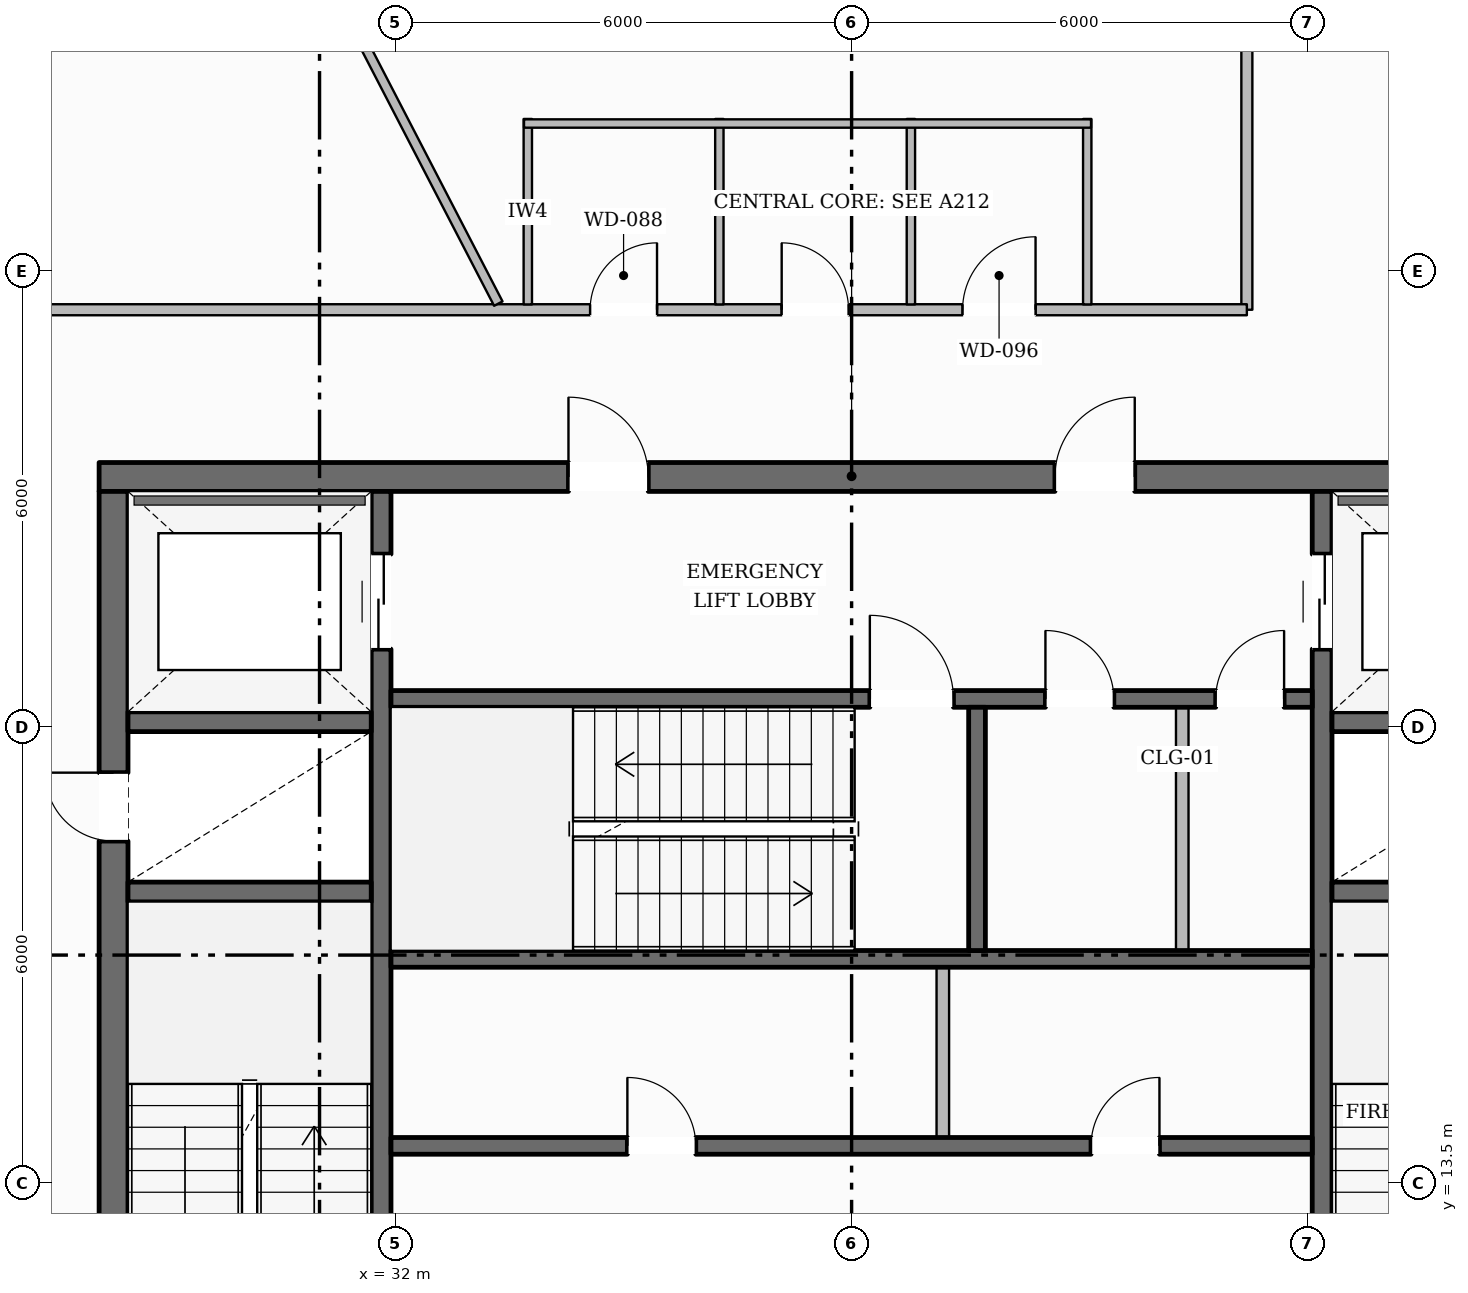
"""IFC4 building model, lengths in metres.
Left out: names, types, materials, properties, quantities, classifications, styles, units other than length and angle.
Written with IfcOpenShell. Run it as: python <this file> out.ifc"""

import sys

from ifc_helpers import new_model, si_unit, direction, frame, frame_2d, origin, place, context, subcontext, project, spatial, rectangle, extrude, element, fill, save


model = new_model("IFC4")
c1 = context("Model", 3, precision=1e-05, world=origin(), true_north=direction((0.0, 1.0)))
c2 = subcontext(c1, "Body", "Model", "MODEL_VIEW")
j1 = project(units=[si_unit("LENGTHUNIT", "METRE"), si_unit("PLANEANGLEUNIT", "RADIAN")], contexts=[c1])
p1 = place(None, origin())
s1 = spatial("IfcSite", under=j1, at=p1, CompositionType="ELEMENT")
p2 = place(p1, origin())
s2 = spatial("IfcBuilding", under=s1, at=p2, CompositionType="ELEMENT")
p3 = place(p2, frame((0.0, 0.0, 304.95)))
s3 = spatial("IfcBuildingStorey", under=s2, at=p3, CompositionType="ELEMENT", Elevation=304.95)
p4 = place(p3, frame((28.1, 22.79, 0.0), z_axis=(0.0, 0.0, 1.0), x_axis=(1.0, 0.0, 0.0)))
e1 = element("IfcWall", 1, at=p4, inside=s3, PredefinedType="SOLIDWALL", context=c2, shape_type="SweptSolid", body=[
    extrude(rectangle(XDim=19.8, YDim=0.38, at=frame_2d((9.9, 0.0))), origin(), (0.0, 0.0, 1.0), 4.77),
])
p5 = place(p4, frame((6.175, 0.0, 0.0)))
e2 = element("IfcOpeningElement", 2, at=p5, cuts=e1, PredefinedType="OPENING", context=c2, shape_type="SweptSolid", body=[
    extrude(rectangle(XDim=1.05, YDim=2.15, at=frame_2d((0.525, 1.075))), frame((0.0, 0.2, 0.0), z_axis=(0.0, -1.0, 0.0), x_axis=(1.0, 0.0, 0.0)), (0.0, 0.0, 1.0), 0.4),
])
p6 = place(p4, frame((12.575, 0.0, 0.0)))
e3 = element("IfcOpeningElement", 3, at=p6, cuts=e1, PredefinedType="OPENING", context=c2, shape_type="SweptSolid", body=[
    extrude(rectangle(XDim=1.05, YDim=2.15, at=frame_2d((0.525, 1.075))), frame((0.0, 0.2, 0.0), z_axis=(0.0, -1.0, 0.0), x_axis=(1.0, 0.0, 0.0)), (0.0, 0.0, 1.0), 0.4),
])
p7 = place(p3, frame((28.29, 9.6, 0.0), z_axis=(0.0, 0.0, 1.0), x_axis=(0.0, 1.0, 0.0)))
e4 = element("IfcWall", 4, at=p7, inside=s3, PredefinedType="SOLIDWALL", context=c2, shape_type="SweptSolid", body=[
    extrude(rectangle(XDim=13.0, YDim=0.38, at=frame_2d((6.5, 0.0))), origin(), (0.0, 0.0, 1.0), 4.77),
])
p8 = place(p7, frame((0.2, 0.0, 0.0)))
e5 = element("IfcOpeningElement", 5, at=p8, cuts=e4, PredefinedType="OPENING", context=c2, shape_type="SweptSolid", body=[
    extrude(rectangle(XDim=1.1, YDim=2.15, at=frame_2d((0.55, 1.075))), frame((0.0, 0.2, 0.0), z_axis=(0.0, -1.0, 0.0), x_axis=(1.0, 0.0, 0.0)), (0.0, 0.0, 1.0), 0.4),
])
p9 = place(p7, frame((8.4, 0.0, 0.0)))
e6 = element("IfcOpeningElement", 6, at=p9, cuts=e4, PredefinedType="OPENING", context=c2, shape_type="SweptSolid", body=[
    extrude(rectangle(XDim=0.9, YDim=2.1, at=frame_2d((0.45, 1.05))), frame((0.0, 0.2, 0.0), z_axis=(0.0, -1.0, 0.0), x_axis=(1.0, 0.0, 0.0)), (0.0, 0.0, 1.0), 0.4),
])
p10 = place(p3, frame((31.81, 9.6, 0.0), z_axis=(0.0, 0.0, 1.0), x_axis=(0.0, 1.0, 0.0)))
e7 = element("IfcWall", 7, at=p10, inside=s3, PredefinedType="SHEAR", context=c2, shape_type="SweptSolid", body=[
    extrude(rectangle(XDim=13.0, YDim=0.26, at=frame_2d((6.5, 0.0))), origin(), (0.0, 0.0, 1.0), 4.77),
])
p11 = place(p10, frame((10.925, 0.0, 0.0)))
e8 = element("IfcOpeningElement", 8, at=p11, cuts=e7, PredefinedType="OPENING", context=c2, shape_type="SweptSolid", body=[
    extrude(rectangle(XDim=1.25, YDim=2.25, at=frame_2d((0.625, 1.125))), frame((0.0, 0.14, 0.0), z_axis=(0.0, -1.0, 0.0), x_axis=(1.0, 0.0, 0.0)), (0.0, 0.0, 1.0), 0.28),
])
p12 = place(p3, frame((44.19, 9.6, 0.0), z_axis=(0.0, 0.0, 1.0), x_axis=(0.0, 1.0, 0.0)))
e9 = element("IfcWall", 9, at=p12, inside=s3, PredefinedType="SHEAR", context=c2, shape_type="SweptSolid", body=[
    extrude(rectangle(XDim=13.0, YDim=0.26, at=frame_2d((6.5, 0.0))), origin(), (0.0, 0.0, 1.0), 4.77),
])
p13 = place(p12, frame((10.925, 0.0, 0.0)))
e10 = element("IfcOpeningElement", 10, at=p13, cuts=e9, PredefinedType="OPENING", context=c2, shape_type="SweptSolid", body=[
    extrude(rectangle(XDim=1.25, YDim=2.25, at=frame_2d((0.625, 1.125))), frame((0.0, 0.14, 0.0), z_axis=(0.0, -1.0, 0.0), x_axis=(1.0, 0.0, 0.0)), (0.0, 0.0, 1.0), 0.28),
])
for number, where, z_axis, x_axis in (
    (11, (28.48, 17.33, 0.0), (0.0, 0.0, 1.0), (1.0, 0.0, 0.0)),
    (12, (28.48, 19.57, 0.0), (0.0, 0.0, 1.0), (1.0, 0.0, 0.0)),
    (13, (44.32, 17.33, 0.0), (0.0, 0.0, 1.0), (1.0, 0.0, 0.0)),
    (14, (44.32, 19.57, 0.0), (0.0, 0.0, 1.0), (1.0, 0.0, 0.0)),
):
    element("IfcWall", number, at=place(p3, frame(where, z_axis=z_axis, x_axis=x_axis)), inside=s3, PredefinedType="SHEAR", context=c2, shape_type="SweptSolid", body=[
        extrude(rectangle(XDim=3.2, YDim=0.26, at=frame_2d((1.6, 0.0))), origin(), (0.0, 0.0, 1.0), 4.77),
    ])
p14 = place(p3, frame((31.94, 19.87, 0.0), z_axis=(0.0, 0.0, 1.0), x_axis=(1.0, 0.0, 0.0)))
e15 = element("IfcWall", 15, at=p14, inside=s3, PredefinedType="SOLIDWALL", context=c2, shape_type="SweptSolid", body=[
    extrude(rectangle(XDim=12.12, YDim=0.22, at=frame_2d((6.06, 0.0))), origin(), (0.0, 0.0, 1.0), 4.77),
])
p15 = place(p14, frame((6.3, 0.0, 0.0)))
e16 = element("IfcOpeningElement", 16, at=p15, cuts=e15, PredefinedType="OPENING", context=c2, shape_type="SweptSolid", body=[
    extrude(rectangle(XDim=1.1, YDim=2.15, at=frame_2d((0.55, 1.075))), frame((0.0, 0.12, 0.0), z_axis=(0.0, -1.0, 0.0), x_axis=(1.0, 0.0, 0.0)), (0.0, 0.0, 1.0), 0.24),
])
p16 = place(p14, frame((8.61, 0.0, 0.0)))
e17 = element("IfcOpeningElement", 17, at=p16, cuts=e15, PredefinedType="OPENING", context=c2, shape_type="SweptSolid", body=[
    extrude(rectangle(XDim=0.9, YDim=2.1, at=frame_2d((0.45, 1.05))), frame((0.0, 0.12, 0.0), z_axis=(0.0, -1.0, 0.0), x_axis=(1.0, 0.0, 0.0)), (0.0, 0.0, 1.0), 0.24),
])
p17 = place(p14, frame((10.85, 0.0, 0.0)))
e18 = element("IfcOpeningElement", 18, at=p17, cuts=e15, PredefinedType="OPENING", context=c2, shape_type="SweptSolid", body=[
    extrude(rectangle(XDim=0.9, YDim=2.1, at=frame_2d((0.45, 1.05))), frame((0.0, 0.12, 0.0), z_axis=(0.0, -1.0, 0.0), x_axis=(1.0, 0.0, 0.0)), (0.0, 0.0, 1.0), 0.24),
])
p18 = place(p3, frame((31.94, 16.45, 0.0), z_axis=(0.0, 0.0, 1.0), x_axis=(1.0, 0.0, 0.0)))
e19 = element("IfcWall", 19, at=p18, inside=s3, PredefinedType="SOLIDWALL", context=c2, shape_type="SweptSolid", body=[
    extrude(rectangle(XDim=12.12, YDim=0.22, at=frame_2d((6.06, 0.0))), origin(), (0.0, 0.0, 1.0), 4.77),
])
p19 = place(p3, frame((39.65, 16.56, 0.0), z_axis=(0.0, 0.0, 1.0), x_axis=(0.0, 1.0, 0.0)))
e20 = element("IfcWall", 20, at=p19, inside=s3, PredefinedType="SOLIDWALL", context=c2, shape_type="SweptSolid", body=[
    extrude(rectangle(XDim=3.2, YDim=0.22, at=frame_2d((1.6, 0.0))), origin(), (0.0, 0.0, 1.0), 4.77),
])
p20 = place(p3, frame((31.94, 13.99, 0.0), z_axis=(0.0, 0.0, 1.0), x_axis=(1.0, 0.0, 0.0)))
e21 = element("IfcWall", 21, at=p20, inside=s3, PredefinedType="SOLIDWALL", context=c2, shape_type="SweptSolid", body=[
    extrude(rectangle(XDim=12.12, YDim=0.22, at=frame_2d((6.06, 0.0))), origin(), (0.0, 0.0, 1.0), 4.77),
])
p21 = place(p20, frame((3.11, 0.0, 0.0)))
e22 = element("IfcOpeningElement", 22, at=p21, cuts=e21, PredefinedType="OPENING", context=c2, shape_type="SweptSolid", body=[
    extrude(rectangle(XDim=0.9, YDim=2.1, at=frame_2d((0.45, 1.05))), frame((0.0, 0.12, 0.0), z_axis=(0.0, -1.0, 0.0), x_axis=(1.0, 0.0, 0.0)), (0.0, 0.0, 1.0), 0.24),
])
p22 = place(p20, frame((9.21, 0.0, 0.0)))
e23 = element("IfcOpeningElement", 23, at=p22, cuts=e21, PredefinedType="OPENING", context=c2, shape_type="SweptSolid", body=[
    extrude(rectangle(XDim=0.9, YDim=2.1, at=frame_2d((0.45, 1.05))), frame((0.0, 0.12, 0.0), z_axis=(0.0, -1.0, 0.0), x_axis=(1.0, 0.0, 0.0)), (0.0, 0.0, 1.0), 0.24),
])
p23 = place(p3, frame((15.972, 10.23, 0.0), z_axis=(0.0, 0.0, 1.0), x_axis=(0.490734788737, 0.871308996352, 0.0)))
e24 = element("IfcWall", 24, at=p23, inside=s3, PredefinedType="STANDARD", context=c2, shape_type="SweptSolid", body=[
    extrude(rectangle(XDim=39.892, YDim=0.35, at=frame_2d((19.946, 0.0))), origin(), (0.0, 0.0, 1.0), 4.012),
])
p24 = place(p23, frame((35.116, 0.0, 0.65)))
e25 = element("IfcOpeningElement", 25, at=p24, cuts=e24, PredefinedType="OPENING", context=c2, shape_type="SweptSolid", body=[
    extrude(rectangle(XDim=2.1, YDim=2.3, at=frame_2d((1.05, 1.15))), frame((0.0, 0.185, 0.0), z_axis=(0.0, -1.0, 0.0), x_axis=(1.0, 0.0, 0.0)), (0.0, 0.0, 1.0), 0.37),
])
p25 = place(p23, frame((2.666, 0.0, 0.65)))
e26 = element("IfcOpeningElement", 26, at=p25, cuts=e24, PredefinedType="OPENING", context=c2, shape_type="SweptSolid", body=[
    extrude(rectangle(XDim=2.1, YDim=2.3, at=frame_2d((1.05, 1.15))), frame((0.0, 0.185, 0.0), z_axis=(0.0, -1.0, 0.0), x_axis=(1.0, 0.0, 0.0)), (0.0, 0.0, 1.0), 0.37),
])
p26 = place(p3, frame((40.452, 44.989, 0.0), z_axis=(0.0, 0.0, 1.0), x_axis=(0.490734788737, -0.871308996352, 0.0)))
e27 = element("IfcWall", 27, at=p26, inside=s3, PredefinedType="STANDARD", context=c2, shape_type="SweptSolid", body=[
    extrude(rectangle(XDim=39.892, YDim=0.35, at=frame_2d((19.946, 0.0))), origin(), (0.0, 0.0, 1.0), 4.012),
])
p27 = place(p26, frame((35.126, 0.0, 0.65)))
e28 = element("IfcOpeningElement", 28, at=p27, cuts=e27, PredefinedType="OPENING", context=c2, shape_type="SweptSolid", body=[
    extrude(rectangle(XDim=2.1, YDim=2.3, at=frame_2d((1.05, 1.15))), frame((0.0, 0.185, 0.0), z_axis=(0.0, -1.0, 0.0), x_axis=(1.0, 0.0, 0.0)), (0.0, 0.0, 1.0), 0.37),
])
p28 = place(p26, frame((2.676, 0.0, 0.65)))
e29 = element("IfcOpeningElement", 29, at=p28, cuts=e27, PredefinedType="OPENING", context=c2, shape_type="SweptSolid", body=[
    extrude(rectangle(XDim=2.1, YDim=2.3, at=frame_2d((1.05, 1.15))), frame((0.0, 0.185, 0.0), z_axis=(0.0, -1.0, 0.0), x_axis=(1.0, 0.0, 0.0)), (0.0, 0.0, 1.0), 0.37),
])
p29 = place(p3, frame((39.2, 14.1, 0.0), z_axis=(0.0, 0.0, 1.0), x_axis=(0.0, 1.0, 0.0)))
e30 = element("IfcWall", 30, at=p29, inside=s3, PredefinedType="PARTITIONING", context=c2, shape_type="SweptSolid", body=[
    extrude(rectangle(XDim=2.24, YDim=0.165, at=frame_2d((1.12, 0.0))), origin(), (0.0, 0.0, 1.0), 4.77),
])
p30 = place(p3, frame((42.35, 16.56, 0.0), z_axis=(0.0, 0.0, 1.0), x_axis=(0.0, 1.0, 0.0)))
e31 = element("IfcWall", 31, at=p30, inside=s3, PredefinedType="PARTITIONING", context=c2, shape_type="SweptSolid", body=[
    extrude(rectangle(XDim=3.2, YDim=0.165, at=frame_2d((1.6, 0.0))), origin(), (0.0, 0.0, 1.0), 4.77),
])
p31 = place(p3, frame((43.2, 24.99, 0.0), z_axis=(0.0, 0.0, 1.0), x_axis=(0.0, 1.0, 0.0)))
e32 = element("IfcWall", 32, at=p31, inside=s3, PredefinedType="PARTITIONING", context=c2, shape_type="SweptSolid", body=[
    extrude(rectangle(XDim=8.884, YDim=0.145, at=frame_2d((4.442, 0.0))), origin(), (0.0, 0.0, 1.0), 4.77),
])
p32 = place(p31, frame((3.742, 0.0, 0.0)))
e33 = element("IfcOpeningElement", 33, at=p32, cuts=e32, PredefinedType="OPENING", context=c2, shape_type="SweptSolid", body=[
    extrude(rectangle(XDim=1.4, YDim=2.2, at=frame_2d((0.7, 1.1))), frame((0.0, 0.083, 0.0), z_axis=(0.0, -1.0, 0.0), x_axis=(1.0, 0.0, 0.0)), (0.0, 0.0, 1.0), 0.165),
])
p33 = place(p3, frame((26.09, 24.99, 0.0), z_axis=(0.0, 0.0, 1.0), x_axis=(1.0, 0.0, 0.0)))
e34 = element("IfcWall", 34, at=p33, inside=s3, PredefinedType="PARTITIONING", context=c2, shape_type="SweptSolid", body=[
    extrude(rectangle(XDim=17.11, YDim=0.145, at=frame_2d((8.555, 0.0))), origin(), (0.0, 0.0, 1.0), 4.77),
])
p34 = place(p33, frame((8.47, 0.0, 0.0)))
e35 = element("IfcOpeningElement", 35, at=p34, cuts=e34, PredefinedType="OPENING", context=c2, shape_type="SweptSolid", body=[
    extrude(rectangle(XDim=0.88, YDim=2.1, at=frame_2d((0.44, 1.05))), frame((0.0, 0.083, 0.0), z_axis=(0.0, -1.0, 0.0), x_axis=(1.0, 0.0, 0.0)), (0.0, 0.0, 1.0), 0.165),
])
p35 = place(p33, frame((10.99, 0.0, 0.0)))
e36 = element("IfcOpeningElement", 36, at=p35, cuts=e34, PredefinedType="OPENING", context=c2, shape_type="SweptSolid", body=[
    extrude(rectangle(XDim=0.88, YDim=2.1, at=frame_2d((0.44, 1.05))), frame((0.0, 0.083, 0.0), z_axis=(0.0, -1.0, 0.0), x_axis=(1.0, 0.0, 0.0)), (0.0, 0.0, 1.0), 0.165),
])
p36 = place(p33, frame((13.37, 0.0, 0.0)))
e37 = element("IfcOpeningElement", 37, at=p36, cuts=e34, PredefinedType="OPENING", context=c2, shape_type="SweptSolid", body=[
    extrude(rectangle(XDim=0.96, YDim=2.1, at=frame_2d((0.48, 1.05))), frame((0.0, 0.083, 0.0), z_axis=(0.0, -1.0, 0.0), x_axis=(1.0, 0.0, 0.0)), (0.0, 0.0, 1.0), 0.165),
])
for number, where, z_axis, x_axis in (
    (38, (33.74, 25.06, 0.0), (0.0, 0.0, 1.0), (0.0, 1.0, 0.0)),
    (39, (36.26, 25.06, 0.0), (0.0, 0.0, 1.0), (0.0, 1.0, 0.0)),
    (40, (38.78, 25.06, 0.0), (0.0, 0.0, 1.0), (0.0, 1.0, 0.0)),
    (41, (41.1, 25.06, 0.0), (0.0, 0.0, 1.0), (0.0, 1.0, 0.0)),
):
    element("IfcWall", number, at=place(p3, frame(where, z_axis=z_axis, x_axis=x_axis)), inside=s3, PredefinedType="PLUMBINGWALL", context=c2, shape_type="SweptSolid", body=[
        extrude(rectangle(XDim=2.44, YDim=0.11, at=frame_2d((1.22, 0.0))), origin(), (0.0, 0.0, 1.0), 4.77),
    ])
p37 = place(p3, frame((33.69, 27.44, 0.0), z_axis=(0.0, 0.0, 1.0), x_axis=(1.0, 0.0, 0.0)))
e42 = element("IfcWall", 42, at=p37, inside=s3, PredefinedType="PLUMBINGWALL", context=c2, shape_type="SweptSolid", body=[
    extrude(rectangle(XDim=7.46, YDim=0.11, at=frame_2d((3.73, 0.0))), origin(), (0.0, 0.0, 1.0), 4.77),
])
p38 = place(p3, frame((33.352, 25.071, 0.0), z_axis=(0.0, 0.0, 1.0), x_axis=(-0.460036151018, 0.887900185695, 0.0)))
e43 = element("IfcWall", 43, at=p38, inside=s3, PredefinedType="PARTITIONING", context=c2, shape_type="SweptSolid", body=[
    extrude(rectangle(XDim=8.75, YDim=0.125, at=frame_2d((4.375, 0.0))), origin(), (0.0, 0.0, 1.0), 4.406),
])
p39 = place(p15, origin())
e44 = element("IfcDoor", 44, at=p39, inside=s3, OperationType="SINGLE_SWING_LEFT", PredefinedType="DOOR", context=c2, shape_type="SweptSolid", body=[
    extrude(rectangle(XDim=1.1, YDim=2.15, at=frame_2d((0.55, 1.075))), frame((0.0, 0.025, 0.0), z_axis=(0.0, -1.0, 0.0), x_axis=(1.0, 0.0, 0.0)), (0.0, 0.0, 1.0), 0.05),
])
fill(e16, e44)
p40 = place(p9, origin())
e45 = element("IfcDoor", 45, at=p40, inside=s3, OperationType="SINGLE_SWING_RIGHT", PredefinedType="DOOR", context=c2, shape_type="SweptSolid", body=[
    extrude(rectangle(XDim=0.9, YDim=2.1, at=frame_2d((0.45, 1.05))), frame((0.0, 0.025, 0.0), z_axis=(0.0, -1.0, 0.0), x_axis=(1.0, 0.0, 0.0)), (0.0, 0.0, 1.0), 0.05),
])
fill(e6, e45)
p41 = place(p5, origin())
e46 = element("IfcDoor", 46, at=p41, inside=s3, OperationType="SINGLE_SWING_LEFT", PredefinedType="DOOR", context=c2, shape_type="SweptSolid", body=[
    extrude(rectangle(XDim=1.05, YDim=2.15, at=frame_2d((0.525, 1.075))), frame((0.0, 0.025, 0.0), z_axis=(0.0, -1.0, 0.0), x_axis=(1.0, 0.0, 0.0)), (0.0, 0.0, 1.0), 0.05),
])
fill(e2, e46)
p42 = place(p6, origin())
e47 = element("IfcDoor", 47, at=p42, inside=s3, OperationType="SINGLE_SWING_RIGHT", PredefinedType="DOOR", context=c2, shape_type="SweptSolid", body=[
    extrude(rectangle(XDim=1.05, YDim=2.15, at=frame_2d((0.525, 1.075))), frame((0.0, 0.025, 0.0), z_axis=(0.0, -1.0, 0.0), x_axis=(1.0, 0.0, 0.0)), (0.0, 0.0, 1.0), 0.05),
])
fill(e3, e47)
p43 = place(p11, origin())
e48 = element("IfcDoor", 48, at=p43, inside=s3, OperationType="DOUBLE_DOOR_SLIDING", PredefinedType="DOOR", context=c2, shape_type="SweptSolid", body=[
    extrude(rectangle(XDim=1.25, YDim=2.25, at=frame_2d((0.625, 1.125))), frame((0.0, 0.025, 0.0), z_axis=(0.0, -1.0, 0.0), x_axis=(1.0, 0.0, 0.0)), (0.0, 0.0, 1.0), 0.05),
])
fill(e8, e48)
p44 = place(p13, origin())
e49 = element("IfcDoor", 49, at=p44, inside=s3, OperationType="DOUBLE_DOOR_SLIDING", PredefinedType="DOOR", context=c2, shape_type="SweptSolid", body=[
    extrude(rectangle(XDim=1.25, YDim=2.25, at=frame_2d((0.625, 1.125))), frame((0.0, 0.025, 0.0), z_axis=(0.0, -1.0, 0.0), x_axis=(1.0, 0.0, 0.0)), (0.0, 0.0, 1.0), 0.05),
])
fill(e10, e49)
p45 = place(p21, origin())
e50 = element("IfcDoor", 50, at=p45, inside=s3, OperationType="SINGLE_SWING_LEFT", PredefinedType="DOOR", context=c2, shape_type="SweptSolid", body=[
    extrude(rectangle(XDim=0.9, YDim=2.1, at=frame_2d((0.45, 1.05))), frame((0.0, 0.025, 0.0), z_axis=(0.0, -1.0, 0.0), x_axis=(1.0, 0.0, 0.0)), (0.0, 0.0, 1.0), 0.05),
])
fill(e22, e50)
p46 = place(p22, origin())
e51 = element("IfcDoor", 51, at=p46, inside=s3, OperationType="SINGLE_SWING_RIGHT", PredefinedType="DOOR", context=c2, shape_type="SweptSolid", body=[
    extrude(rectangle(XDim=0.9, YDim=2.1, at=frame_2d((0.45, 1.05))), frame((0.0, 0.025, 0.0), z_axis=(0.0, -1.0, 0.0), x_axis=(1.0, 0.0, 0.0)), (0.0, 0.0, 1.0), 0.05),
])
fill(e23, e51)
p47 = place(p16, origin())
e52 = element("IfcDoor", 52, at=p47, inside=s3, OperationType="SINGLE_SWING_LEFT", PredefinedType="DOOR", context=c2, shape_type="SweptSolid", body=[
    extrude(rectangle(XDim=0.9, YDim=2.1, at=frame_2d((0.45, 1.05))), frame((0.0, 0.025, 0.0), z_axis=(0.0, -1.0, 0.0), x_axis=(1.0, 0.0, 0.0)), (0.0, 0.0, 1.0), 0.05),
])
fill(e17, e52)
p48 = place(p17, origin())
e53 = element("IfcDoor", 53, at=p48, inside=s3, OperationType="SINGLE_SWING_RIGHT", PredefinedType="DOOR", context=c2, shape_type="SweptSolid", body=[
    extrude(rectangle(XDim=0.9, YDim=2.1, at=frame_2d((0.45, 1.05))), frame((0.0, 0.025, 0.0), z_axis=(0.0, -1.0, 0.0), x_axis=(1.0, 0.0, 0.0)), (0.0, 0.0, 1.0), 0.05),
])
fill(e18, e53)
p49 = place(p34, origin())
e54 = element("IfcDoor", 54, at=p49, inside=s3, OperationType="SINGLE_SWING_RIGHT", PredefinedType="DOOR", context=c2, shape_type="SweptSolid", body=[
    extrude(rectangle(XDim=0.88, YDim=2.1, at=frame_2d((0.44, 1.05))), frame((0.0, 0.025, 0.0), z_axis=(0.0, -1.0, 0.0), x_axis=(1.0, 0.0, 0.0)), (0.0, 0.0, 1.0), 0.05),
])
fill(e35, e54)
p50 = place(p35, origin())
e55 = element("IfcDoor", 55, at=p50, inside=s3, OperationType="SINGLE_SWING_LEFT", PredefinedType="DOOR", context=c2, shape_type="SweptSolid", body=[
    extrude(rectangle(XDim=0.88, YDim=2.1, at=frame_2d((0.44, 1.05))), frame((0.0, 0.025, 0.0), z_axis=(0.0, -1.0, 0.0), x_axis=(1.0, 0.0, 0.0)), (0.0, 0.0, 1.0), 0.05),
])
fill(e36, e55)
p51 = place(p36, origin())
e56 = element("IfcDoor", 56, at=p51, inside=s3, OperationType="SINGLE_SWING_RIGHT", PredefinedType="DOOR", context=c2, shape_type="SweptSolid", body=[
    extrude(rectangle(XDim=0.96, YDim=2.1, at=frame_2d((0.48, 1.05))), frame((0.0, 0.025, 0.0), z_axis=(0.0, -1.0, 0.0), x_axis=(1.0, 0.0, 0.0)), (0.0, 0.0, 1.0), 0.05),
])
fill(e37, e56)
save(model, sys.argv[1])
